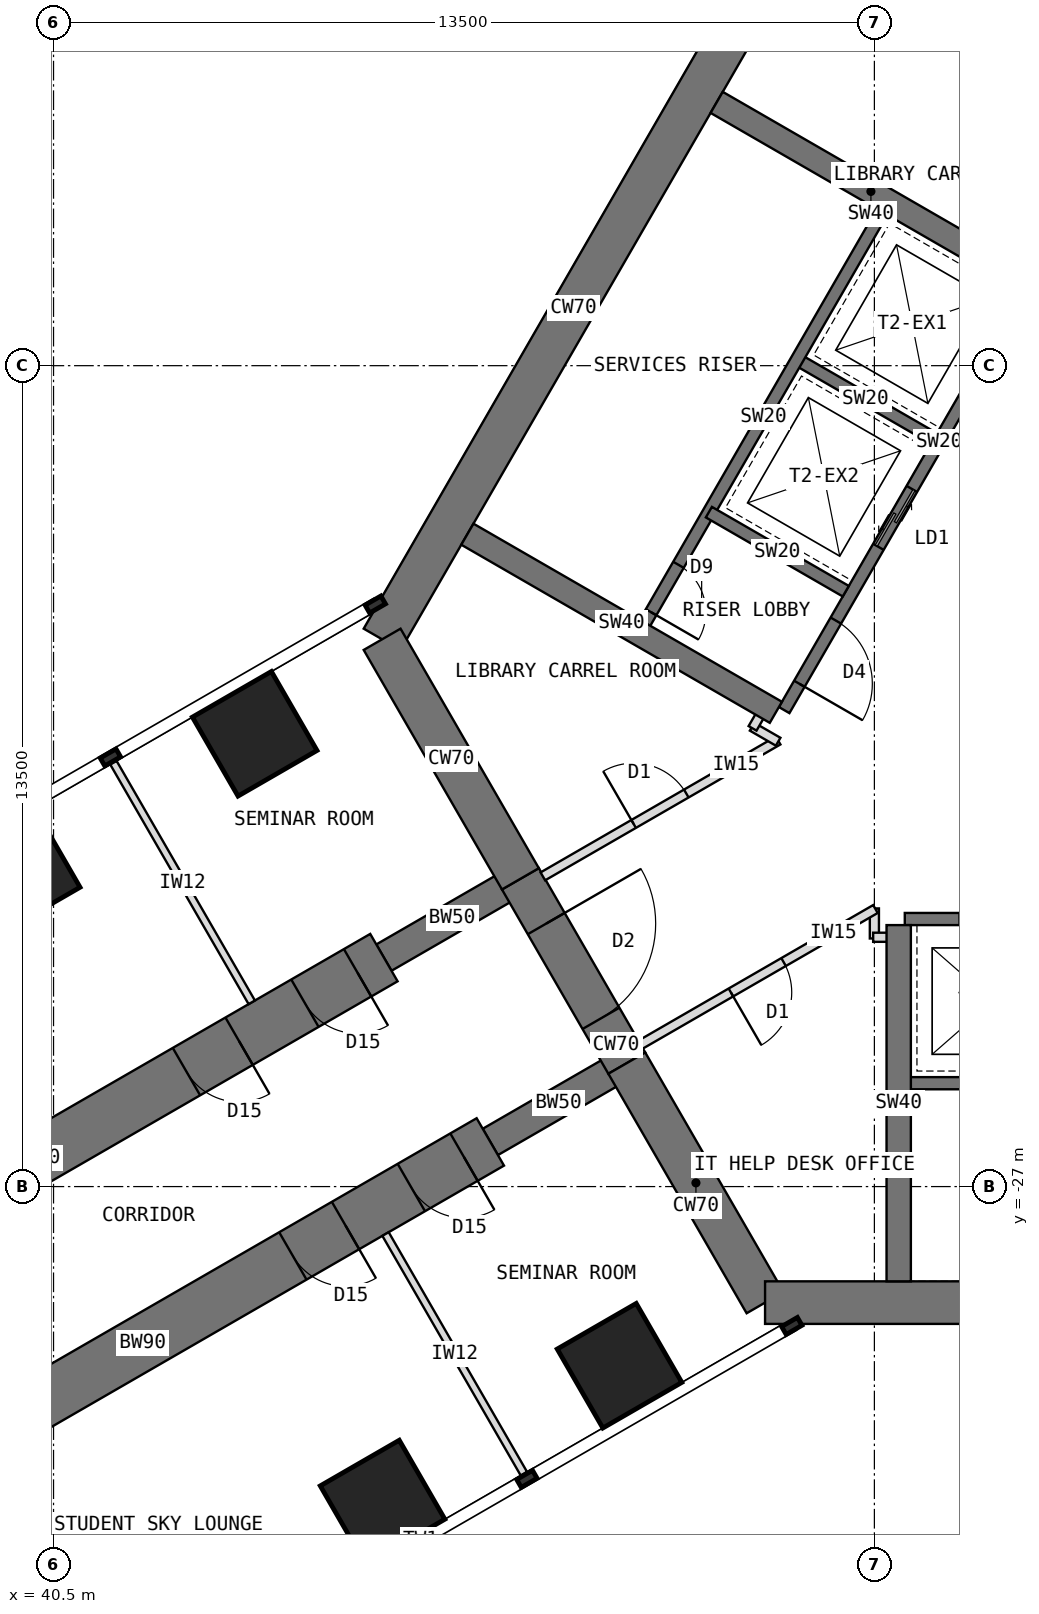
"""IFC4 building model, lengths in metres.
Left out: names, types, materials, properties, quantities, classifications, styles, units other than length and angle.
Written with IfcOpenShell. Run it as: python <this file> out.ifc"""

import sys

from ifc_helpers import new_model, si_unit, direction, frame, frame_2d, origin, origin_2d, place, context, subcontext, project, spatial, rectangle, extrude, element, fill, save


model = new_model("IFC4")
c1 = context("Model", 3, precision=1e-05, world=origin(), true_north=direction((0.0, 1.0)))
c2 = subcontext(c1, "Body", "Model", "MODEL_VIEW")
j1 = project(units=[si_unit("LENGTHUNIT", "METRE"), si_unit("PLANEANGLEUNIT", "RADIAN")], contexts=[c1])
p1 = place(None, origin())
s1 = spatial("IfcSite", under=j1, at=p1, CompositionType="ELEMENT")
p2 = place(p1, origin())
s2 = spatial("IfcBuilding", under=s1, at=p2, CompositionType="ELEMENT")
p3 = place(p2, frame((0.0, 0.0, 20.5)))
s3 = spatial("IfcBuildingStorey", under=s2, at=p3, CompositionType="ELEMENT", Elevation=20.5)
p4 = place(p3, frame((52.202, -7.092, 0.0), z_axis=(0.0, 0.0, 1.0), x_axis=(-0.500005998175, -0.866021940709, 0.0)))
e1 = element("IfcWall", 1, at=p4, inside=s3, PredefinedType="SHEAR", context=c2, shape_type="SweptSolid", body=[
    extrude(rectangle(XDim=12.596, YDim=0.7, at=frame_2d((6.298, 0.0))), origin(), (0.0, 0.0, 1.0), 4.0),
])
p5 = place(p3, frame((45.904, -18.0, 0.0), z_axis=(0.0, 0.0, 1.0), x_axis=(0.500024481964, -0.866011268655, 0.0)))
e2 = element("IfcWall", 2, at=p5, inside=s3, PredefinedType="SHEAR", context=c2, shape_type="SweptSolid", body=[
    extrude(rectangle(XDim=4.548, YDim=0.7, at=frame_2d((2.274, 0.0))), origin(), (0.0, 0.0, 1.0), 4.0),
])
p6 = place(p3, frame((48.178, -21.939, 0.0), z_axis=(0.0, 0.0, 1.0), x_axis=(0.500010275428, -0.866019471182, 0.0)))
e3 = element("IfcWall", 3, at=p6, inside=s3, PredefinedType="SHEAR", context=c2, shape_type="SweptSolid", body=[
    extrude(rectangle(XDim=3.5, YDim=0.7, at=frame_2d((1.75, 0.0))), origin(), (0.0, 0.0, 1.0), 4.0),
])
p7 = place(p6, frame((0.85, 0.0, 0.0)))
e4 = element("IfcOpeningElement", 4, at=p7, cuts=e3, PredefinedType="OPENING", context=c2, shape_type="SweptSolid", body=[
    extrude(rectangle(XDim=1.8, YDim=2.1, at=frame_2d((0.9, 1.05))), frame((0.0, 0.36, 0.0), z_axis=(0.0, -1.0, 0.0), x_axis=(1.0, 0.0, 0.0)), (0.0, 0.0, 1.0), 0.72),
])
p8 = place(p3, frame((49.928, -24.97, 0.0), z_axis=(0.0, 0.0, 1.0), x_axis=(0.499984222037, -0.866034513004, 0.0)))
e5 = element("IfcWall", 5, at=p8, inside=s3, PredefinedType="SHEAR", context=c2, shape_type="SweptSolid", body=[
    extrude(rectangle(XDim=4.548, YDim=0.7, at=frame_2d((2.274, 0.0))), origin(), (0.0, 0.0, 1.0), 4.0),
])
p9 = place(p3, frame((52.202, -28.908, 0.0), z_axis=(0.0, 0.0, 1.0), x_axis=(1.0, 0.0, 0.0)))
e6 = element("IfcWall", 6, at=p9, inside=s3, PredefinedType="SHEAR", context=c2, shape_type="SweptSolid", body=[
    extrude(rectangle(XDim=12.596, YDim=0.7, at=frame_2d((6.298, 0.0))), origin(), (0.0, 0.0, 1.0), 4.0),
])
p10 = place(p3, frame((49.928, -24.97, 0.0), z_axis=(0.0, 0.0, 1.0), x_axis=(-0.866031863473, -0.499988811324, 0.0)))
e7 = element("IfcWall", 7, at=p10, inside=s3, PredefinedType="SHEAR", context=c2, shape_type="SweptSolid", body=[
    extrude(rectangle(XDim=2.592, YDim=0.5, at=frame_2d((1.296, 0.0))), origin(), (0.0, 0.0, 1.0), 4.0),
])
p11 = place(p3, frame((47.684, -26.266, 0.0), z_axis=(0.0, 0.0, 1.0), x_axis=(-0.866027579429, -0.499996231654, 0.0)))
e8 = element("IfcWall", 8, at=p11, inside=s3, PredefinedType="SHEAR", context=c2, shape_type="SweptSolid", body=[
    extrude(rectangle(XDim=13.2, YDim=0.9, at=frame_2d((6.6, 0.0))), origin(), (0.0, 0.0, 1.0), 4.0),
])
p12 = place(p11, frame((0.5, 0.0, 0.0)))
e9 = element("IfcOpeningElement", 9, at=p12, cuts=e8, PredefinedType="OPENING", context=c2, shape_type="SweptSolid", body=[
    extrude(rectangle(XDim=1.0, YDim=2.1, at=frame_2d((0.5, 1.05))), frame((0.0, 0.46, 0.0), z_axis=(0.0, -1.0, 0.0), x_axis=(1.0, 0.0, 0.0)), (0.0, 0.0, 1.0), 0.92),
])
p13 = place(p11, frame((2.75, 0.0, 0.0)))
e10 = element("IfcOpeningElement", 10, at=p13, cuts=e8, PredefinedType="OPENING", context=c2, shape_type="SweptSolid", body=[
    extrude(rectangle(XDim=1.0, YDim=2.1, at=frame_2d((0.5, 1.05))), frame((0.0, 0.46, 0.0), z_axis=(0.0, -1.0, 0.0), x_axis=(1.0, 0.0, 0.0)), (0.0, 0.0, 1.0), 0.92),
])
p14 = place(p3, frame((48.178, -21.939, 0.0), z_axis=(0.0, 0.0, 1.0), x_axis=(-0.866072649678, -0.499918158782, 0.0)))
e11 = element("IfcWall", 11, at=p14, inside=s3, PredefinedType="SHEAR", context=c2, shape_type="SweptSolid", body=[
    extrude(rectangle(XDim=2.592, YDim=0.5, at=frame_2d((1.296, 0.0))), origin(), (0.0, 0.0, 1.0), 4.0),
])
p15 = place(p3, frame((45.934, -23.234, 0.0), z_axis=(0.0, 0.0, 1.0), x_axis=(-0.866019570528, -0.500010103361, 0.0)))
e12 = element("IfcWall", 12, at=p15, inside=s3, PredefinedType="SHEAR", context=c2, shape_type="SweptSolid", body=[
    extrude(rectangle(XDim=13.2, YDim=0.9, at=frame_2d((6.6, 0.0))), origin(), (0.0, 0.0, 1.0), 4.0),
])
p16 = place(p15, frame((0.5, 0.0, 0.0)))
e13 = element("IfcOpeningElement", 13, at=p16, cuts=e12, PredefinedType="OPENING", context=c2, shape_type="SweptSolid", body=[
    extrude(rectangle(XDim=1.0, YDim=2.1, at=frame_2d((0.5, 1.05))), frame((0.0, 0.46, 0.0), z_axis=(0.0, -1.0, 0.0), x_axis=(1.0, 0.0, 0.0)), (0.0, 0.0, 1.0), 0.92),
])
p17 = place(p15, frame((2.75, 0.0, 0.0)))
e14 = element("IfcOpeningElement", 14, at=p17, cuts=e12, PredefinedType="OPENING", context=c2, shape_type="SweptSolid", body=[
    extrude(rectangle(XDim=1.0, YDim=2.1, at=frame_2d((0.5, 1.05))), frame((0.0, 0.46, 0.0), z_axis=(0.0, -1.0, 0.0), x_axis=(1.0, 0.0, 0.0)), (0.0, 0.0, 1.0), 0.92),
])
for number, where, z_axis, x_axis in (
    (15, (49.809, -29.946, 0.0), (0.0, 0.0, 1.0), (0.866, 0.5, 0.0)),
    (16, (43.809, -19.554, 0.0), (0.0, 0.0, 1.0), (0.866, 0.5, 0.0)),
    (17, (45.912, -32.196, 0.0), (0.0, 0.0, 1.0), (0.866, 0.5, 0.0)),
    (18, (39.912, -21.804, 0.0), (0.0, 0.0, 1.0), (0.866, 0.5, 0.0)),
):
    element("IfcColumn", number, at=place(p3, frame(where, z_axis=z_axis, x_axis=x_axis)), inside=s3, PredefinedType="COLUMN", context=c2, shape_type="SweptSolid", body=[
        extrude(rectangle(XDim=1.5, YDim=1.5, at=origin_2d()), origin(), (0.0, 0.0, 1.0), 4.0),
    ])
p18 = place(p3, frame((56.516, -12.236, 0.0), z_axis=(0.0, 0.0, 1.0), x_axis=(-0.49999894854, -0.866026010844, 0.0)))
e19 = element("IfcWall", 19, at=p18, inside=s3, PredefinedType="SHEAR", context=c2, shape_type="SweptSolid", body=[
    extrude(rectangle(XDim=8.0, YDim=0.2, at=frame_2d((4.0, 0.0))), origin(), (0.0, 0.0, 1.0), 4.0),
])
p19 = place(p18, frame((6.3, 0.0, 0.0)))
e20 = element("IfcOpeningElement", 20, at=p19, cuts=e19, PredefinedType="OPENING", context=c2, shape_type="SweptSolid", body=[
    extrude(rectangle(XDim=1.2, YDim=2.1, at=frame_2d((0.6, 1.05))), frame((0.0, 0.11, 0.0), z_axis=(0.0, -1.0, 0.0), x_axis=(1.0, 0.0, 0.0)), (0.0, 0.0, 1.0), 0.22),
])
p20 = place(p18, frame((0.9, 0.0, 0.0)))
e21 = element("IfcOpeningElement", 21, at=p20, cuts=e19, PredefinedType="OPENING", context=c2, shape_type="SweptSolid", body=[
    extrude(rectangle(XDim=1.1, YDim=2.2, at=frame_2d((0.55, 1.1))), frame((0.0, 0.11, 0.0), z_axis=(0.0, -1.0, 0.0), x_axis=(1.0, 0.0, 0.0)), (0.0, 0.0, 1.0), 0.22),
])
p21 = place(p18, frame((3.8, 0.0, 0.0)))
e22 = element("IfcOpeningElement", 22, at=p21, cuts=e19, PredefinedType="OPENING", context=c2, shape_type="SweptSolid", body=[
    extrude(rectangle(XDim=1.1, YDim=2.2, at=frame_2d((0.55, 1.1))), frame((0.0, 0.11, 0.0), z_axis=(0.0, -1.0, 0.0), x_axis=(1.0, 0.0, 0.0)), (0.0, 0.0, 1.0), 0.22),
])
for number, where, z_axis, x_axis in (
    (23, (54.98, -14.697, 0.0), (0.0, 0.0, 1.0), (-0.866, 0.5, 0.0)),
    (24, (53.53, -17.209, 0.0), (0.0, 0.0, 1.0), (-0.866, 0.5, 0.0)),
):
    element("IfcWall", number, at=place(p3, frame(where, z_axis=z_axis, x_axis=x_axis)), inside=s3, PredefinedType="SHEAR", context=c2, shape_type="SweptSolid", body=[
        extrude(rectangle(XDim=2.6, YDim=0.2, at=frame_2d((1.3, 0.0))), origin(), (0.0, 0.0, 1.0), 4.0),
    ])
p22 = place(p3, frame((54.178, -10.886, 0.0), z_axis=(0.0, 0.0, 1.0), x_axis=(-0.49999894854, -0.866026010844, 0.0)))
e25 = element("IfcWall", 25, at=p22, inside=s3, PredefinedType="SHEAR", context=c2, shape_type="SweptSolid", body=[
    extrude(rectangle(XDim=8.0, YDim=0.2, at=frame_2d((4.0, 0.0))), origin(), (0.0, 0.0, 1.0), 4.0),
])
p23 = place(p22, frame((6.8, 0.0, 0.0)))
e26 = element("IfcOpeningElement", 26, at=p23, cuts=e25, PredefinedType="OPENING", context=c2, shape_type="SweptSolid", body=[
    extrude(rectangle(XDim=0.9, YDim=2.1, at=frame_2d((0.45, 1.05))), frame((0.0, 0.11, 0.0), z_axis=(0.0, -1.0, 0.0), x_axis=(1.0, 0.0, 0.0)), (0.0, 0.0, 1.0), 0.22),
])
for number, where, z_axis, x_axis in (
    (27, (52.38, -19.201, 0.0), (0.0, 0.0, 1.0), (-0.866, 0.5, 0.0)),
    (28, (56.48, -12.099, 0.0), (0.0, 0.0, 1.0), (-0.866, 0.5, 0.0)),
):
    element("IfcWall", number, at=place(p3, frame(where, z_axis=z_axis, x_axis=x_axis)), inside=s3, PredefinedType="SHEAR", context=c2, shape_type="SweptSolid", body=[
        extrude(rectangle(XDim=5.858, YDim=0.4, at=frame_2d((2.929, 0.0))), origin(), (0.0, 0.0, 1.0), 4.0),
    ])
p24 = place(p3, frame((54.5, -22.6, 0.0), z_axis=(0.0, 0.0, 1.0), x_axis=(1.0, 0.0, 0.0)))
e29 = element("IfcWall", 29, at=p24, inside=s3, PredefinedType="SHEAR", context=c2, shape_type="SweptSolid", body=[
    extrude(rectangle(XDim=8.0, YDim=0.2, at=frame_2d((4.0, 0.0))), origin(), (0.0, 0.0, 1.0), 4.0),
])
p25 = place(p24, frame((6.3, 0.0, 0.0)))
e30 = element("IfcOpeningElement", 30, at=p25, cuts=e29, PredefinedType="OPENING", context=c2, shape_type="SweptSolid", body=[
    extrude(rectangle(XDim=1.2, YDim=2.1, at=frame_2d((0.6, 1.05))), frame((0.0, 0.11, 0.0), z_axis=(0.0, -1.0, 0.0), x_axis=(1.0, 0.0, 0.0)), (0.0, 0.0, 1.0), 0.22),
])
p26 = place(p24, frame((0.9, 0.0, 0.0)))
e31 = element("IfcOpeningElement", 31, at=p26, cuts=e29, PredefinedType="OPENING", context=c2, shape_type="SweptSolid", body=[
    extrude(rectangle(XDim=1.1, YDim=2.2, at=frame_2d((0.55, 1.1))), frame((0.0, 0.11, 0.0), z_axis=(0.0, -1.0, 0.0), x_axis=(1.0, 0.0, 0.0)), (0.0, 0.0, 1.0), 0.22),
])
p27 = place(p3, frame((54.5, -25.3, 0.0), z_axis=(0.0, 0.0, 1.0), x_axis=(1.0, 0.0, 0.0)))
e32 = element("IfcWall", 32, at=p27, inside=s3, PredefinedType="SHEAR", context=c2, shape_type="SweptSolid", body=[
    extrude(rectangle(XDim=8.0, YDim=0.2, at=frame_2d((4.0, 0.0))), origin(), (0.0, 0.0, 1.0), 4.0),
])
p28 = place(p27, frame((6.7, 0.0, 0.0)))
e33 = element("IfcOpeningElement", 33, at=p28, cuts=e32, PredefinedType="OPENING", context=c2, shape_type="SweptSolid", body=[
    extrude(rectangle(XDim=1.1, YDim=2.1, at=frame_2d((0.55, 1.05))), frame((0.0, 0.11, 0.0), z_axis=(0.0, -1.0, 0.0), x_axis=(1.0, 0.0, 0.0)), (0.0, 0.0, 1.0), 0.22),
])
p29 = place(p3, frame((54.4, -22.7, 0.0), z_axis=(0.0, 0.0, 1.0), x_axis=(0.0, -1.0, 0.0)))
e34 = element("IfcWall", 34, at=p29, inside=s3, PredefinedType="SHEAR", context=c2, shape_type="SweptSolid", body=[
    extrude(rectangle(XDim=5.858, YDim=0.4, at=frame_2d((2.929, 0.0))), origin(), (0.0, 0.0, 1.0), 4.0),
])
for number, where, z_axis, x_axis in (
    (35, (45.96, -27.78, 0.0), (0.0, 0.0, 1.0), (0.5, -0.866, 0.0)),
    (36, (43.76, -23.97, 0.0), (0.0, 0.0, 1.0), (-0.5, 0.866, 0.0)),
):
    element("IfcWall", number, at=place(p3, frame(where, z_axis=z_axis, x_axis=x_axis)), inside=s3, PredefinedType="PARTITIONING", context=c2, shape_type="SweptSolid", body=[
        extrude(rectangle(XDim=4.55, YDim=0.12, at=frame_2d((2.275, 0.0))), origin(), (0.0, 0.0, 1.0), 3.8),
    ])
p30 = place(p3, frame((54.0, -22.92, 0.0), z_axis=(0.0, 0.0, 1.0), x_axis=(0.0, 1.0, 0.0)))
e37 = element("IfcWall", 37, at=p30, inside=s3, PredefinedType="PARTITIONING", context=c2, shape_type="SweptSolid", body=[
    extrude(rectangle(XDim=0.494, YDim=0.15, at=frame_2d((0.247, 0.0))), origin(), (0.0, 0.0, 1.0), 3.8),
])
p31 = place(p3, frame((54.017, -22.436, 0.0), z_axis=(0.0, 0.0, 1.0), x_axis=(-0.866015446554, -0.500017246033, 0.0)))
e38 = element("IfcWall", 38, at=p31, inside=s3, PredefinedType="PARTITIONING", context=c2, shape_type="SweptSolid", body=[
    extrude(rectangle(XDim=4.469, YDim=0.15, at=frame_2d((2.234, 0.0))), origin(), (0.0, 0.0, 1.0), 3.8),
])
p32 = place(p31, frame((1.744, 0.0, 0.0)))
e39 = element("IfcOpeningElement", 39, at=p32, cuts=e38, PredefinedType="OPENING", context=c2, shape_type="SweptSolid", body=[
    extrude(rectangle(XDim=1.0, YDim=2.1, at=frame_2d((0.5, 1.05))), frame((0.0, 0.085, 0.0), z_axis=(0.0, -1.0, 0.0), x_axis=(1.0, 0.0, 0.0)), (0.0, 0.0, 1.0), 0.17),
])
p33 = place(p3, frame((48.548, -21.898, 0.0), z_axis=(0.0, 0.0, 1.0), x_axis=(0.866025445582, 0.499999927604, 0.0)))
e40 = element("IfcWall", 40, at=p33, inside=s3, PredefinedType="PARTITIONING", context=c2, shape_type="SweptSolid", body=[
    extrude(rectangle(XDim=4.468, YDim=0.15, at=frame_2d((2.234, 0.0))), origin(), (0.0, 0.0, 1.0), 3.8),
])
p34 = place(p33, frame((1.724, 0.0, 0.0)))
e41 = element("IfcOpeningElement", 41, at=p34, cuts=e40, PredefinedType="OPENING", context=c2, shape_type="SweptSolid", body=[
    extrude(rectangle(XDim=1.0, YDim=2.1, at=frame_2d((0.5, 1.05))), frame((0.0, 0.085, 0.0), z_axis=(0.0, -1.0, 0.0), x_axis=(1.0, 0.0, 0.0)), (0.0, 0.0, 1.0), 0.17),
])
p35 = place(p3, frame((52.417, -19.684, 0.0), z_axis=(0.0, 0.0, 1.0), x_axis=(-0.865831790172, 0.50033519877, 0.0)))
e42 = element("IfcWall", 42, at=p35, inside=s3, PredefinedType="PARTITIONING", context=c2, shape_type="SweptSolid", body=[
    extrude(rectangle(XDim=0.494, YDim=0.15, at=frame_2d((0.247, 0.0))), origin(), (0.0, 0.0, 1.0), 3.8),
])
for number, where, z_axis, x_axis in (
    (43, (51.997, -19.464, 0.0), (0.0, 0.0, 1.0), (0.5, 0.866, 0.0)),
    (44, (54.41, -22.9, 0.0), (0.0, 0.0, 1.0), (-1.0, 0.0, 0.0)),
):
    element("IfcWall", number, at=place(p3, frame(where, z_axis=z_axis, x_axis=x_axis)), inside=s3, PredefinedType="PARTITIONING", context=c2, shape_type="SweptSolid", body=[
        extrude(rectangle(XDim=0.43, YDim=0.15, at=frame_2d((0.215, 0.0))), origin(), (0.0, 0.0, 1.0), 3.8),
    ])
p36 = place(p19, origin())
e45 = element("IfcDoor", 45, at=p36, inside=s3, OperationType="SINGLE_SWING_RIGHT", PredefinedType="DOOR", context=c2, shape_type="SweptSolid", body=[
    extrude(rectangle(XDim=1.2, YDim=2.1, at=frame_2d((0.6, 1.05))), frame((0.0, 0.025, 0.0), z_axis=(0.0, -1.0, 0.0), x_axis=(1.0, 0.0, 0.0)), (0.0, 0.0, 1.0), 0.05),
])
fill(e20, e45)
p37 = place(p21, origin())
e46 = element("IfcDoor", 46, at=p37, inside=s3, OperationType="DOUBLE_DOOR_SLIDING", PredefinedType="DOOR", context=c2, shape_type="SweptSolid", body=[
    extrude(rectangle(XDim=1.1, YDim=2.2, at=frame_2d((0.55, 1.1))), frame((0.0, 0.025, 0.0), z_axis=(0.0, -1.0, 0.0), x_axis=(1.0, 0.0, 0.0)), (0.0, 0.0, 1.0), 0.05),
])
fill(e22, e46)
p38 = place(p23, origin())
e47 = element("IfcDoor", 47, at=p38, inside=s3, OperationType="SINGLE_SWING_RIGHT", PredefinedType="DOOR", context=c2, shape_type="SweptSolid", body=[
    extrude(rectangle(XDim=0.9, YDim=2.1, at=frame_2d((0.45, 1.05))), frame((0.0, 0.025, 0.0), z_axis=(0.0, -1.0, 0.0), x_axis=(1.0, 0.0, 0.0)), (0.0, 0.0, 1.0), 0.05),
])
fill(e26, e47)
p39 = place(p7, origin())
e48 = element("IfcDoor", 48, at=p39, inside=s3, OperationType="DOUBLE_DOOR_DOUBLE_SWING", PredefinedType="DOOR", context=c2, shape_type="SweptSolid", body=[
    extrude(rectangle(XDim=1.72, YDim=2.06, at=frame_2d((0.9, 1.03))), frame((0.0, 0.025, 0.0), z_axis=(0.0, -1.0, 0.0), x_axis=(1.0, 0.0, 0.0)), (0.0, 0.0, 1.0), 0.05),
    extrude(rectangle(XDim=0.04, YDim=2.1, at=frame_2d((0.02, 1.05))), frame((0.0, 0.35, 0.0), z_axis=(0.0, -1.0, 0.0), x_axis=(1.0, 0.0, 0.0)), (0.0, 0.0, 1.0), 0.699),
    extrude(rectangle(XDim=0.04, YDim=2.1, at=frame_2d((1.78, 1.05))), frame((0.0, 0.35, 0.0), z_axis=(0.0, -1.0, 0.0), x_axis=(1.0, 0.0, 0.0)), (0.0, 0.0, 1.0), 0.699),
    extrude(rectangle(XDim=1.72, YDim=0.04, at=frame_2d((0.9, 2.08))), frame((0.0, 0.35, 0.0), z_axis=(0.0, -1.0, 0.0), x_axis=(1.0, 0.0, 0.0)), (0.0, 0.0, 1.0), 0.699),
])
fill(e4, e48)
p40 = place(p34, origin())
e49 = element("IfcDoor", 49, at=p40, inside=s3, OperationType="SINGLE_SWING_LEFT", PredefinedType="DOOR", context=c2, shape_type="SweptSolid", body=[
    extrude(rectangle(XDim=1.0, YDim=2.1, at=frame_2d((0.5, 1.05))), frame((0.0, 0.025, 0.0), z_axis=(0.0, -1.0, 0.0), x_axis=(1.0, 0.0, 0.0)), (0.0, 0.0, 1.0), 0.05),
])
fill(e41, e49)
p41 = place(p32, origin())
e50 = element("IfcDoor", 50, at=p41, inside=s3, OperationType="SINGLE_SWING_RIGHT", PredefinedType="DOOR", context=c2, shape_type="SweptSolid", body=[
    extrude(rectangle(XDim=1.0, YDim=2.1, at=frame_2d((0.5, 1.05))), frame((0.0, 0.025, 0.0), z_axis=(0.0, -1.0, 0.0), x_axis=(1.0, 0.0, 0.0)), (0.0, 0.0, 1.0), 0.05),
])
fill(e39, e50)
p42 = place(p12, origin())
e51 = element("IfcDoor", 51, at=p42, inside=s3, OperationType="SINGLE_SWING_LEFT", PredefinedType="DOOR", context=c2, shape_type="SweptSolid", body=[
    extrude(rectangle(XDim=0.92, YDim=2.06, at=frame_2d((0.5, 1.03))), frame((0.0, 0.025, 0.0), z_axis=(0.0, -1.0, 0.0), x_axis=(1.0, 0.0, 0.0)), (0.0, 0.0, 1.0), 0.05),
    extrude(rectangle(XDim=0.04, YDim=2.1, at=frame_2d((0.02, 1.05))), frame((0.0, 0.45, 0.0), z_axis=(0.0, -1.0, 0.0), x_axis=(1.0, 0.0, 0.0)), (0.0, 0.0, 1.0), 0.899),
    extrude(rectangle(XDim=0.04, YDim=2.1, at=frame_2d((0.98, 1.05))), frame((0.0, 0.45, 0.0), z_axis=(0.0, -1.0, 0.0), x_axis=(1.0, 0.0, 0.0)), (0.0, 0.0, 1.0), 0.899),
    extrude(rectangle(XDim=0.92, YDim=0.04, at=frame_2d((0.5, 2.08))), frame((0.0, 0.45, 0.0), z_axis=(0.0, -1.0, 0.0), x_axis=(1.0, 0.0, 0.0)), (0.0, 0.0, 1.0), 0.899),
])
fill(e9, e51)
p43 = place(p13, origin())
e52 = element("IfcDoor", 52, at=p43, inside=s3, OperationType="SINGLE_SWING_LEFT", PredefinedType="DOOR", context=c2, shape_type="SweptSolid", body=[
    extrude(rectangle(XDim=0.92, YDim=2.06, at=frame_2d((0.5, 1.03))), frame((0.0, 0.025, 0.0), z_axis=(0.0, -1.0, 0.0), x_axis=(1.0, 0.0, 0.0)), (0.0, 0.0, 1.0), 0.05),
    extrude(rectangle(XDim=0.04, YDim=2.1, at=frame_2d((0.02, 1.05))), frame((0.0, 0.45, 0.0), z_axis=(0.0, -1.0, 0.0), x_axis=(1.0, 0.0, 0.0)), (0.0, 0.0, 1.0), 0.899),
    extrude(rectangle(XDim=0.04, YDim=2.1, at=frame_2d((0.98, 1.05))), frame((0.0, 0.45, 0.0), z_axis=(0.0, -1.0, 0.0), x_axis=(1.0, 0.0, 0.0)), (0.0, 0.0, 1.0), 0.899),
    extrude(rectangle(XDim=0.92, YDim=0.04, at=frame_2d((0.5, 2.08))), frame((0.0, 0.45, 0.0), z_axis=(0.0, -1.0, 0.0), x_axis=(1.0, 0.0, 0.0)), (0.0, 0.0, 1.0), 0.899),
])
fill(e10, e52)
p44 = place(p16, origin())
e53 = element("IfcDoor", 53, at=p44, inside=s3, OperationType="SINGLE_SWING_LEFT", PredefinedType="DOOR", context=c2, shape_type="SweptSolid", body=[
    extrude(rectangle(XDim=0.92, YDim=2.06, at=frame_2d((0.5, 1.03))), frame((0.0, 0.025, 0.0), z_axis=(0.0, -1.0, 0.0), x_axis=(1.0, 0.0, 0.0)), (0.0, 0.0, 1.0), 0.05),
    extrude(rectangle(XDim=0.04, YDim=2.1, at=frame_2d((0.02, 1.05))), frame((0.0, 0.45, 0.0), z_axis=(0.0, -1.0, 0.0), x_axis=(1.0, 0.0, 0.0)), (0.0, 0.0, 1.0), 0.899),
    extrude(rectangle(XDim=0.04, YDim=2.1, at=frame_2d((0.98, 1.05))), frame((0.0, 0.45, 0.0), z_axis=(0.0, -1.0, 0.0), x_axis=(1.0, 0.0, 0.0)), (0.0, 0.0, 1.0), 0.899),
    extrude(rectangle(XDim=0.92, YDim=0.04, at=frame_2d((0.5, 2.08))), frame((0.0, 0.45, 0.0), z_axis=(0.0, -1.0, 0.0), x_axis=(1.0, 0.0, 0.0)), (0.0, 0.0, 1.0), 0.899),
])
fill(e13, e53)
p45 = place(p17, origin())
e54 = element("IfcDoor", 54, at=p45, inside=s3, OperationType="SINGLE_SWING_LEFT", PredefinedType="DOOR", context=c2, shape_type="SweptSolid", body=[
    extrude(rectangle(XDim=0.92, YDim=2.06, at=frame_2d((0.5, 1.03))), frame((0.0, 0.025, 0.0), z_axis=(0.0, -1.0, 0.0), x_axis=(1.0, 0.0, 0.0)), (0.0, 0.0, 1.0), 0.05),
    extrude(rectangle(XDim=0.04, YDim=2.1, at=frame_2d((0.02, 1.05))), frame((0.0, 0.45, 0.0), z_axis=(0.0, -1.0, 0.0), x_axis=(1.0, 0.0, 0.0)), (0.0, 0.0, 1.0), 0.899),
    extrude(rectangle(XDim=0.04, YDim=2.1, at=frame_2d((0.98, 1.05))), frame((0.0, 0.45, 0.0), z_axis=(0.0, -1.0, 0.0), x_axis=(1.0, 0.0, 0.0)), (0.0, 0.0, 1.0), 0.899),
    extrude(rectangle(XDim=0.92, YDim=0.04, at=frame_2d((0.5, 2.08))), frame((0.0, 0.45, 0.0), z_axis=(0.0, -1.0, 0.0), x_axis=(1.0, 0.0, 0.0)), (0.0, 0.0, 1.0), 0.899),
])
fill(e14, e54)
save(model, sys.argv[1])
